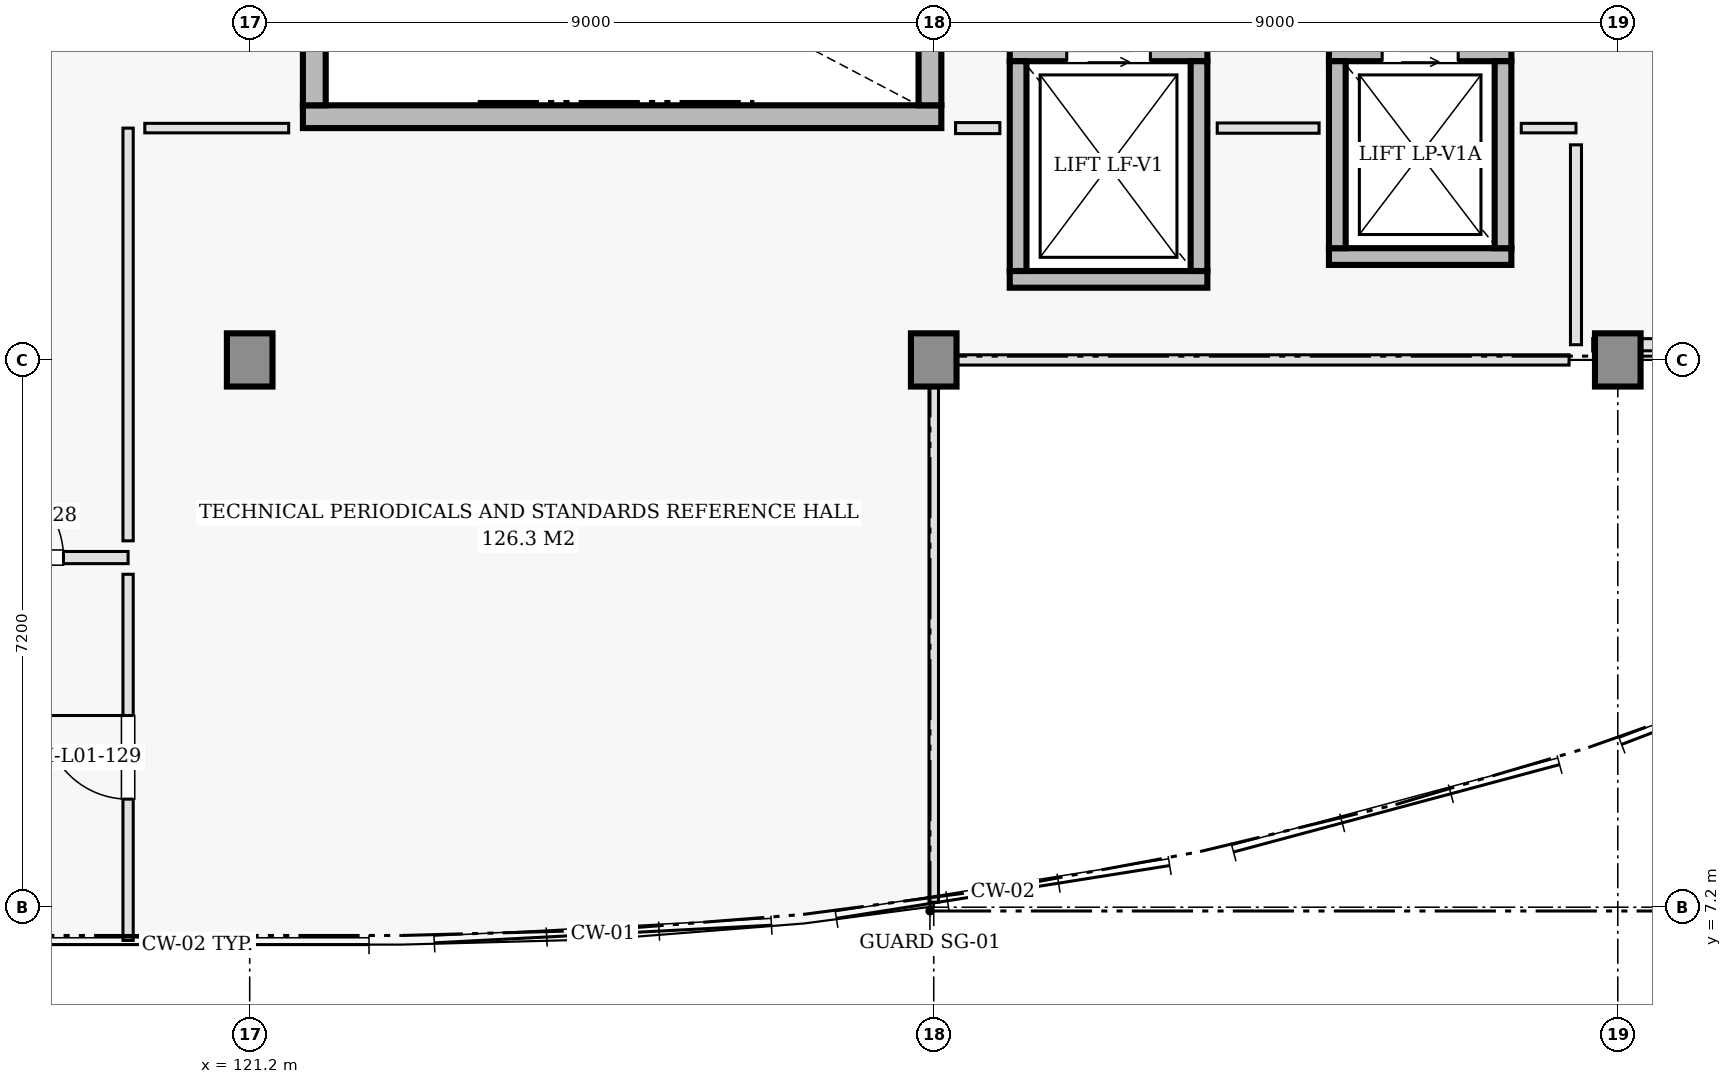
"""IFC4 building model, lengths in metres.
Left out: names, types, materials, properties, quantities, classifications, styles, units other than length and angle.
Written with IfcOpenShell. Run it as: python <this file> out.ifc"""

import sys

from ifc_helpers import new_model, si_unit, direction, frame, frame_2d, origin, origin_2d, place, context, subcontext, project, spatial, rectangle, extrude, element, fill, save


model = new_model("IFC4")
c1 = context("Model", 3, precision=1e-05, world=origin(), true_north=direction((0.0, 1.0)))
c2 = subcontext(c1, "Body", "Model", "MODEL_VIEW")
j1 = project(units=[si_unit("LENGTHUNIT", "METRE"), si_unit("PLANEANGLEUNIT", "RADIAN")], contexts=[c1])
p1 = place(None, origin())
s1 = spatial("IfcSite", under=j1, at=p1, CompositionType="ELEMENT")
p2 = place(p1, origin())
s2 = spatial("IfcBuilding", under=s1, at=p2, CompositionType="ELEMENT")
p3 = place(p2, frame((0.0, 0.0, 4.8)))
s3 = spatial("IfcBuildingStorey", under=s2, at=p3, CompositionType="ELEMENT", Elevation=4.8)
for number, where, z_axis, x_axis in (
    (1, (121.2, 14.4, 0.0), (0.0, 0.0, 1.0), (1.0, 0.0, 0.0)),
    (2, (130.2, 14.4, 0.0), (0.0, 0.0, 1.0), (1.0, 0.0, 0.0)),
    (3, (139.2, 14.4, 0.0), (0.0, 0.0, 1.0), (1.0, 0.0, 0.0)),
):
    element("IfcColumn", number, at=place(p3, frame(where, z_axis=z_axis, x_axis=x_axis)), inside=s3, PredefinedType="COLUMN", context=c2, shape_type="SweptSolid", body=[
        extrude(rectangle(XDim=0.7, YDim=0.7, at=origin_2d()), origin(), (0.0, 0.0, 1.0), 4.8),
    ])
p4 = place(p3, frame((121.9, 17.6, 0.0), z_axis=(0.0, 0.0, 1.0), x_axis=(1.0, 0.0, 0.0)))
e4 = element("IfcWall", 4, at=p4, inside=s3, PredefinedType="SHEAR", context=c2, shape_type="SweptSolid", body=[
    extrude(rectangle(XDim=8.4, YDim=0.3, at=frame_2d((4.2, 0.0))), origin(), (0.0, 0.0, 1.0), 4.48),
])
for number, where, z_axis, x_axis in (
    (5, (122.05, 17.75, 0.0), (0.0, 0.0, 1.0), (0.0, 1.0, 0.0)),
    (6, (130.15, 17.75, 0.0), (0.0, 0.0, 1.0), (0.0, 1.0, 0.0)),
):
    element("IfcWall", number, at=place(p3, frame(where, z_axis=z_axis, x_axis=x_axis)), inside=s3, PredefinedType="SHEAR", context=c2, shape_type="SweptSolid", body=[
        extrude(rectangle(XDim=4.1, YDim=0.3, at=frame_2d((2.05, 0.0))), origin(), (0.0, 0.0, 1.0), 4.48),
    ])
p5 = place(p3, frame((131.2, 15.46, 0.0), z_axis=(0.0, 0.0, 1.0), x_axis=(1.0, 0.0, 0.0)))
e7 = element("IfcWall", 7, at=p5, inside=s3, PredefinedType="SHEAR", context=c2, shape_type="SweptSolid", body=[
    extrude(rectangle(XDim=2.6, YDim=0.22, at=frame_2d((1.3, 0.0))), origin(), (0.0, 0.0, 1.0), 4.48),
])
p6 = place(p3, frame((131.2, 18.44, 0.0), z_axis=(0.0, 0.0, 1.0), x_axis=(1.0, 0.0, 0.0)))
e8 = element("IfcWall", 8, at=p6, inside=s3, PredefinedType="SHEAR", context=c2, shape_type="SweptSolid", body=[
    extrude(rectangle(XDim=2.6, YDim=0.22, at=frame_2d((1.3, 0.0))), origin(), (0.0, 0.0, 1.0), 4.48),
])
p7 = place(p6, frame((0.75, 0.0, 0.0)))
e9 = element("IfcOpeningElement", 9, at=p7, cuts=e8, PredefinedType="OPENING", context=c2, shape_type="SweptSolid", body=[
    extrude(rectangle(XDim=1.1, YDim=2.15, at=frame_2d((0.55, 1.075))), frame((0.0, 0.12, 0.0), z_axis=(0.0, -1.0, 0.0), x_axis=(1.0, 0.0, 0.0)), (0.0, 0.0, 1.0), 0.24),
])
for number, where, z_axis, x_axis in (
    (10, (131.31, 15.57, 0.0), (0.0, 0.0, 1.0), (0.0, 1.0, 0.0)),
    (11, (133.69, 15.57, 0.0), (0.0, 0.0, 1.0), (0.0, 1.0, 0.0)),
):
    element("IfcWall", number, at=place(p3, frame(where, z_axis=z_axis, x_axis=x_axis)), inside=s3, PredefinedType="SHEAR", context=c2, shape_type="SweptSolid", body=[
        extrude(rectangle(XDim=2.76, YDim=0.22, at=frame_2d((1.38, 0.0))), origin(), (0.0, 0.0, 1.0), 4.48),
    ])
p8 = place(p3, frame((135.4, 15.76, 0.0), z_axis=(0.0, 0.0, 1.0), x_axis=(1.0, 0.0, 0.0)))
e12 = element("IfcWall", 12, at=p8, inside=s3, PredefinedType="SHEAR", context=c2, shape_type="SweptSolid", body=[
    extrude(rectangle(XDim=2.4, YDim=0.22, at=frame_2d((1.2, 0.0))), origin(), (0.0, 0.0, 1.0), 4.48),
])
p9 = place(p3, frame((135.4, 18.44, 0.0), z_axis=(0.0, 0.0, 1.0), x_axis=(1.0, 0.0, 0.0)))
e13 = element("IfcWall", 13, at=p9, inside=s3, PredefinedType="SHEAR", context=c2, shape_type="SweptSolid", body=[
    extrude(rectangle(XDim=2.4, YDim=0.22, at=frame_2d((1.2, 0.0))), origin(), (0.0, 0.0, 1.0), 4.48),
])
p10 = place(p9, frame((0.7, 0.0, 0.0)))
e14 = element("IfcOpeningElement", 14, at=p10, cuts=e13, PredefinedType="OPENING", context=c2, shape_type="SweptSolid", body=[
    extrude(rectangle(XDim=1.0, YDim=2.15, at=frame_2d((0.5, 1.075))), frame((0.0, 0.12, 0.0), z_axis=(0.0, -1.0, 0.0), x_axis=(1.0, 0.0, 0.0)), (0.0, 0.0, 1.0), 0.24),
])
for number, where, z_axis, x_axis in (
    (15, (135.51, 15.87, 0.0), (0.0, 0.0, 1.0), (0.0, 1.0, 0.0)),
    (16, (137.69, 15.87, 0.0), (0.0, 0.0, 1.0), (0.0, 1.0, 0.0)),
):
    element("IfcWall", number, at=place(p3, frame(where, z_axis=z_axis, x_axis=x_axis)), inside=s3, PredefinedType="SHEAR", context=c2, shape_type="SweptSolid", body=[
        extrude(rectangle(XDim=2.46, YDim=0.22, at=frame_2d((1.23, 0.0))), origin(), (0.0, 0.0, 1.0), 4.48),
    ])
p11 = place(p3, frame((116.8, 11.8, 0.0), z_axis=(0.0, 0.0, 1.0), x_axis=(1.0, 0.0, 0.0)))
e17 = element("IfcWall", 17, at=p11, inside=s3, PredefinedType="PARTITIONING", context=c2, shape_type="SweptSolid", body=[
    extrude(rectangle(XDim=2.8, YDim=0.16, at=frame_2d((1.4, 0.0))), origin(), (0.0, 0.0, 1.0), 4.48),
])
p12 = place(p11, frame((0.85, 0.0, 0.0)))
e18 = element("IfcOpeningElement", 18, at=p12, cuts=e17, PredefinedType="OPENING", context=c2, shape_type="SweptSolid", body=[
    extrude(rectangle(XDim=1.1, YDim=2.15, at=frame_2d((0.55, 1.075))), frame((0.0, 0.09, 0.0), z_axis=(0.0, -1.0, 0.0), x_axis=(1.0, 0.0, 0.0)), (0.0, 0.0, 1.0), 0.18),
])
p13 = place(p3, frame((119.6, 6.763, 0.0), z_axis=(0.0, 0.0, 1.0), x_axis=(0.0, 1.0, 0.0)))
e19 = element("IfcWall", 19, at=p13, inside=s3, PredefinedType="PARTITIONING", context=c2, shape_type="SweptSolid", body=[
    extrude(rectangle(XDim=4.817, YDim=0.135, at=frame_2d((2.409, 0.0))), origin(), (0.0, 0.0, 1.0), 4.48),
])
p14 = place(p13, frame((1.859, 0.0, 0.0)))
e20 = element("IfcOpeningElement", 20, at=p14, cuts=e19, PredefinedType="OPENING", context=c2, shape_type="SweptSolid", body=[
    extrude(rectangle(XDim=1.1, YDim=2.15, at=frame_2d((0.55, 1.075))), frame((0.0, 0.078, 0.0), z_axis=(0.0, -1.0, 0.0), x_axis=(1.0, 0.0, 0.0)), (0.0, 0.0, 1.0), 0.155),
])
p15 = place(p3, frame((119.6, 12.02, 0.0), z_axis=(0.0, 0.0, 1.0), x_axis=(0.0, 1.0, 0.0)))
e21 = element("IfcWall", 21, at=p15, inside=s3, PredefinedType="PARTITIONING", context=c2, shape_type="SweptSolid", body=[
    extrude(rectangle(XDim=5.43, YDim=0.135, at=frame_2d((2.715, 0.0))), origin(), (0.0, 0.0, 1.0), 3.665),
])
p16 = place(p3, frame((119.82, 17.45, 0.0), z_axis=(0.0, 0.0, 1.0), x_axis=(1.0, 0.0, 0.0)))
e22 = element("IfcWall", 22, at=p16, inside=s3, PredefinedType="PARTITIONING", context=c2, shape_type="SweptSolid", body=[
    extrude(rectangle(XDim=1.893, YDim=0.125, at=frame_2d((0.946, 0.0))), origin(), (0.0, 0.0, 1.0), 3.815),
])
p17 = place(p3, frame((130.487, 17.45, 0.0), z_axis=(0.0, 0.0, 1.0), x_axis=(1.0, 0.0, 0.0)))
e23 = element("IfcWall", 23, at=p17, inside=s3, PredefinedType="PARTITIONING", context=c2, shape_type="SweptSolid", body=[
    extrude(rectangle(XDim=0.583, YDim=0.145, at=frame_2d((0.292, 0.0))), origin(), (0.0, 0.0, 1.0), 4.48),
])
p18 = place(p3, frame((133.93, 17.45, 0.0), z_axis=(0.0, 0.0, 1.0), x_axis=(1.0, 0.0, 0.0)))
e24 = element("IfcWall", 24, at=p18, inside=s3, PredefinedType="PARTITIONING", context=c2, shape_type="SweptSolid", body=[
    extrude(rectangle(XDim=1.34, YDim=0.135, at=frame_2d((0.67, 0.0))), origin(), (0.0, 0.0, 1.0), 4.48),
])
p19 = place(p3, frame((137.93, 17.45, 0.0), z_axis=(0.0, 0.0, 1.0), x_axis=(1.0, 0.0, 0.0)))
e25 = element("IfcWall", 25, at=p19, inside=s3, PredefinedType="PARTITIONING", context=c2, shape_type="SweptSolid", body=[
    extrude(rectangle(XDim=0.72, YDim=0.125, at=frame_2d((0.36, 0.0))), origin(), (0.0, 0.0, 1.0), 4.48),
])
p20 = place(p3, frame((138.65, 14.6, 0.0), z_axis=(0.0, 0.0, 1.0), x_axis=(0.0, 1.0, 0.0)))
e26 = element("IfcWall", 26, at=p20, inside=s3, PredefinedType="PARTITIONING", context=c2, shape_type="SweptSolid", body=[
    extrude(rectangle(XDim=2.63, YDim=0.145, at=frame_2d((1.315, 0.0))), origin(), (0.0, 0.0, 1.0), 3.665),
])
p21 = place(p3, frame((130.2, 14.4, 0.0), z_axis=(0.0, 0.0, 1.0), x_axis=(1.0, 0.0, 0.0)))
e27 = element("IfcWall", 27, at=p21, inside=s3, PredefinedType="PARTITIONING", context=c2, shape_type="SweptSolid", body=[
    extrude(rectangle(XDim=8.359, YDim=0.135, at=frame_2d((4.18, 0.0))), origin(), (0.0, 0.0, 1.0), 3.565),
])
p22 = place(p3, frame((130.2, 7.266, 0.0), z_axis=(0.0, 0.0, 1.0), x_axis=(0.0, 1.0, 0.0)))
e28 = element("IfcWall", 28, at=p22, inside=s3, PredefinedType="PARTITIONING", context=c2, shape_type="SweptSolid", body=[
    extrude(rectangle(XDim=6.914, YDim=0.125, at=frame_2d((3.457, 0.0))), origin(), (0.0, 0.0, 1.0), 3.565),
])
p23 = place(p3, frame((138.87, 14.6, 0.0), z_axis=(0.0, 0.0, 1.0), x_axis=(1.0, 0.0, 0.0)))
e29 = element("IfcWall", 29, at=p23, inside=s3, PredefinedType="PARTITIONING", context=c2, shape_type="SweptSolid", body=[
    extrude(rectangle(XDim=2.36, YDim=0.16, at=frame_2d((1.18, 0.0))), origin(), (0.0, 0.0, 1.0), 3.665),
])
p24 = place(p7, origin())
e30 = element("IfcDoor", 30, at=p24, inside=s3, OperationType="SLIDING_TO_LEFT", PredefinedType="DOOR", context=c2, shape_type="SweptSolid", body=[
    extrude(rectangle(XDim=1.1, YDim=2.15, at=frame_2d((0.55, 1.075))), frame((0.0, 0.025, 0.0), z_axis=(0.0, -1.0, 0.0), x_axis=(1.0, 0.0, 0.0)), (0.0, 0.0, 1.0), 0.05),
])
fill(e9, e30)
p25 = place(p10, origin())
e31 = element("IfcDoor", 31, at=p25, inside=s3, OperationType="SLIDING_TO_RIGHT", PredefinedType="DOOR", context=c2, shape_type="SweptSolid", body=[
    extrude(rectangle(XDim=1.0, YDim=2.15, at=frame_2d((0.5, 1.075))), frame((0.0, 0.025, 0.0), z_axis=(0.0, -1.0, 0.0), x_axis=(1.0, 0.0, 0.0)), (0.0, 0.0, 1.0), 0.05),
])
fill(e14, e31)
p26 = place(p12, origin())
e32 = element("IfcDoor", 32, at=p26, inside=s3, OperationType="SINGLE_SWING_LEFT", PredefinedType="DOOR", context=c2, shape_type="SweptSolid", body=[
    extrude(rectangle(XDim=1.1, YDim=2.15, at=frame_2d((0.55, 1.075))), frame((0.0, 0.025, 0.0), z_axis=(0.0, -1.0, 0.0), x_axis=(1.0, 0.0, 0.0)), (0.0, 0.0, 1.0), 0.05),
])
fill(e18, e32)
p27 = place(p14, origin())
e33 = element("IfcDoor", 33, at=p27, inside=s3, OperationType="SINGLE_SWING_RIGHT", PredefinedType="DOOR", context=c2, shape_type="SweptSolid", body=[
    extrude(rectangle(XDim=1.1, YDim=2.15, at=frame_2d((0.55, 1.075))), frame((0.0, 0.025, 0.0), z_axis=(0.0, -1.0, 0.0), x_axis=(1.0, 0.0, 0.0)), (0.0, 0.0, 1.0), 0.05),
])
fill(e20, e33)
save(model, sys.argv[1])
